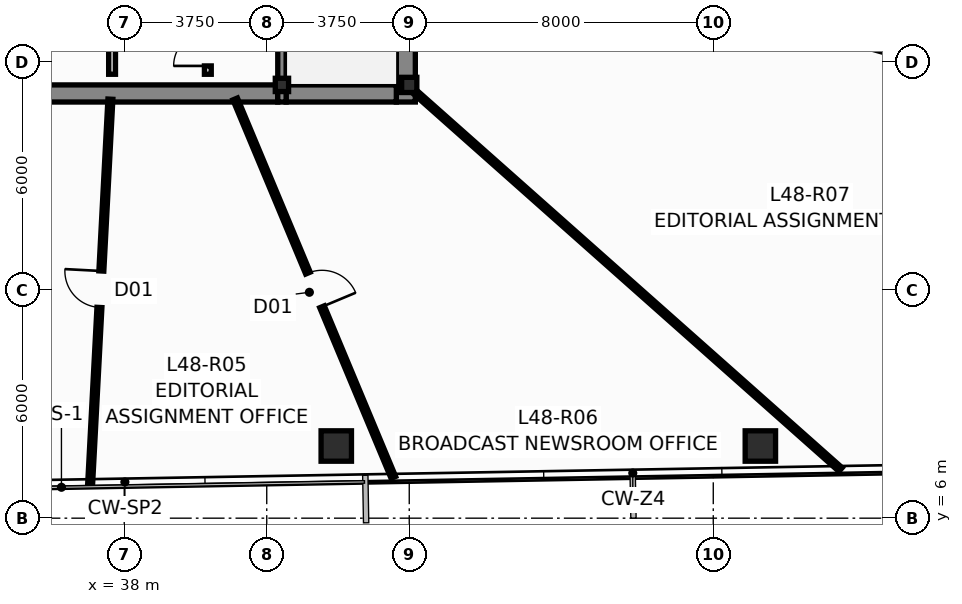
"""IFC4 building model, lengths in metres.
Left out: names, types, materials, properties, quantities, classifications, styles, units other than length and angle.
Written with IfcOpenShell. Run it as: python <this file> out.ifc"""

import sys

from ifc_helpers import new_model, si_unit, direction, frame, frame_2d, origin, origin_2d, place, context, subcontext, project, spatial, rectangle, hollow_rectangle, i_section, extrude, source, transform, mapped, element, fill, save


model = new_model("IFC4")
c1 = context("Model", 3, precision=1e-05, world=origin(), true_north=direction((0.0, 1.0)))
c2 = subcontext(c1, "Body", "Model", "MODEL_VIEW")
j1 = project(units=[si_unit("LENGTHUNIT", "METRE"), si_unit("PLANEANGLEUNIT", "RADIAN")], contexts=[c1])
p1 = place(None, origin())
s1 = spatial("IfcSite", under=j1, at=p1, CompositionType="ELEMENT")
p2 = place(p1, origin())
s2 = spatial("IfcBuilding", under=s1, at=p2, CompositionType="ELEMENT")
p3 = place(p2, frame((0.0, 0.0, 184.05)))
s3 = spatial("IfcBuildingStorey", under=s2, at=p3, CompositionType="ELEMENT", Elevation=184.05)
m1 = source(origin(), c2, "Body", "SweptSolid", [
    extrude(i_section(OverallWidth=0.4, OverallDepth=0.4, WebThickness=0.02, FlangeThickness=0.032, at=origin_2d()), origin(), (0.0, 0.0, 1.0), 3.65),
])
p4 = place(p3, frame((45.5, 17.4, 0.0), z_axis=(0.0, 0.0, 1.0), x_axis=(1.0, 0.0, 0.0)))
e1 = element("IfcColumn", 1, at=p4, inside=s3, PredefinedType="COLUMN", context=c2, shape_type="MappedRepresentation", body=[
    mapped(m1, transform((0.0, 0.0, 0.0), scale=1.0)),
])
m2 = source(origin(), c2, "Body", "SweptSolid", [
    extrude(hollow_rectangle(XDim=0.35, YDim=0.35, WallThickness=0.016, at=origin_2d()), origin(), (0.0, 0.0, 1.0), 3.65),
])
p5 = place(p3, frame((42.15, 17.4, 0.0), z_axis=(0.0, 0.0, 1.0), x_axis=(1.0, 0.0, 0.0)))
e2 = element("IfcColumn", 2, at=p5, inside=s3, PredefinedType="COLUMN", context=c2, shape_type="MappedRepresentation", body=[
    mapped(m2, transform((0.0, 0.0, 0.0), scale=1.0)),
])
p6 = place(p3, frame((45.41, 16.95, 0.0), z_axis=(0.0, 0.0, 1.0), x_axis=(0.0, 1.0, 0.0)))
e3 = element("IfcWall", 3, at=p6, inside=s3, PredefinedType="SHEAR", context=c2, shape_type="SweptSolid", body=[
    extrude(rectangle(XDim=13.275, YDim=0.5, at=frame_2d((6.638, 0.0))), origin(), (0.0, 0.0, 1.0), 3.65),
])
p7 = place(p6, frame((6.4, 0.0, 0.0)))
e4 = element("IfcOpeningElement", 4, at=p7, cuts=e3, PredefinedType="OPENING", context=c2, shape_type="SweptSolid", body=[
    extrude(rectangle(XDim=1.12, YDim=2.15, at=frame_2d((0.56, 1.075))), frame((0.0, 0.262, 0.0), z_axis=(0.0, -1.0, 0.0), x_axis=(1.0, 0.0, 0.0)), (0.0, 0.0, 1.0), 0.524),
])
p8 = place(p6, frame((10.85, 0.0, 0.0)))
e5 = element("IfcOpeningElement", 5, at=p8, cuts=e3, PredefinedType="OPENING", context=c2, shape_type="SweptSolid", body=[
    extrude(rectangle(XDim=1.2, YDim=2.2, at=frame_2d((0.6, 1.1))), frame((0.0, 0.262, 0.0), z_axis=(0.0, -1.0, 0.0), x_axis=(1.0, 0.0, 0.0)), (0.0, 0.0, 1.0), 0.524),
])
p9 = place(p3, frame((33.96, 17.175, 0.0), z_axis=(0.0, 0.0, 1.0), x_axis=(1.0, 0.0, 0.0)))
e6 = element("IfcWall", 6, at=p9, inside=s3, PredefinedType="SHEAR", context=c2, shape_type="SweptSolid", body=[
    extrude(rectangle(XDim=8.08, YDim=0.45, at=frame_2d((4.04, 0.0))), origin(), (0.0, 0.0, 1.0), 3.65),
])
p10 = place(p3, frame((42.26, 17.175, 0.0), z_axis=(0.0, 0.0, 1.0), x_axis=(1.0, 0.0, 0.0)))
e7 = element("IfcWall", 7, at=p10, inside=s3, PredefinedType="SHEAR", context=c2, shape_type="SweptSolid", body=[
    extrude(rectangle(XDim=2.9, YDim=0.45, at=frame_2d((1.45, 0.0))), origin(), (0.0, 0.0, 1.0), 3.65),
])
p11 = place(p3, frame((42.15, 16.95, 0.0), z_axis=(0.0, 0.0, 1.0), x_axis=(0.0, 1.0, 0.0)))
e8 = element("IfcWall", 8, at=p11, inside=s3, PredefinedType="SHEAR", context=c2, shape_type="SweptSolid", body=[
    extrude(rectangle(XDim=13.275, YDim=0.22, at=frame_2d((6.638, 0.0))), origin(), (0.0, 0.0, 1.0), 3.65),
])
m3 = source(origin(), c2, "Body", "SweptSolid", [
    extrude(hollow_rectangle(XDim=0.8, YDim=0.8, WallThickness=0.045, at=origin_2d()), origin(), (0.0, 0.0, 1.0), 3.651),
])
p12 = place(p3, frame((43.58, 7.899, 0.0), z_axis=(0.004480682206, 0.019795252729, 0.999794014513), x_axis=(-0.975326687046, 0.220766513622, 0.0)))
e9 = element("IfcColumn", 9, at=p12, inside=s3, PredefinedType="COLUMN", context=c2, shape_type="MappedRepresentation", body=[
    mapped(m3, transform((0.0, 0.0, 0.0), scale=1.0)),
])
m4 = source(origin(), c2, "Body", "SweptSolid", [
    extrude(hollow_rectangle(XDim=0.8, YDim=0.8, WallThickness=0.045, at=origin_2d()), origin(), (0.0, 0.0, 1.0), 3.651),
])
p13 = place(p3, frame((54.74, 7.899, 0.0), z_axis=(0.013440967269, 0.019793663242, 0.999713734673), x_axis=(-0.827290216258, 0.561774775229, 0.0)))
e10 = element("IfcColumn", 10, at=p13, inside=s3, PredefinedType="COLUMN", context=c2, shape_type="MappedRepresentation", body=[
    mapped(m4, transform((0.0, 0.0, 0.0), scale=1.0)),
])
p14 = place(p3, frame((37.68, 17.68, 0.0), z_axis=(0.0, 0.0, 1.0), x_axis=(0.0, 1.0, 0.0)))
e11 = element("IfcWall", 11, at=p14, inside=s3, PredefinedType="PARTITIONING", context=c2, shape_type="SweptSolid", body=[
    extrude(rectangle(XDim=2.7, YDim=0.18, at=frame_2d((1.35, 0.0))), origin(), (0.0, 0.0, 1.0), 3.4),
])
p15 = place(p14, frame((0.85, 0.0, 0.0)))
e12 = element("IfcOpeningElement", 12, at=p15, cuts=e11, PredefinedType="OPENING", context=c2, shape_type="SweptSolid", body=[
    extrude(rectangle(XDim=0.9, YDim=2.1, at=frame_2d((0.45, 1.05))), frame((0.0, 0.102, 0.0), z_axis=(0.0, -1.0, 0.0), x_axis=(1.0, 0.0, 0.0)), (0.0, 0.0, 1.0), 0.204),
])
p16 = place(p3, frame((40.2, 17.68, 0.0), z_axis=(0.0, 0.0, 1.0), x_axis=(0.0, 1.0, 0.0)))
e13 = element("IfcWall", 13, at=p16, inside=s3, PredefinedType="PARTITIONING", context=c2, shape_type="SweptSolid", body=[
    extrude(rectangle(XDim=2.7, YDim=0.18, at=frame_2d((1.35, 0.0))), origin(), (0.0, 0.0, 1.0), 3.4),
])
p17 = place(p16, frame((0.22, 0.0, 0.0)))
e14 = element("IfcOpeningElement", 14, at=p17, cuts=e13, PredefinedType="OPENING", context=c2, shape_type="SweptSolid", body=[
    extrude(rectangle(XDim=0.9, YDim=2.1, at=frame_2d((0.45, 1.05))), frame((0.0, 0.102, 0.0), z_axis=(0.0, -1.0, 0.0), x_axis=(1.0, 0.0, 0.0)), (0.0, 0.0, 1.0), 0.204),
])
p18 = place(p16, frame((1.54, 0.0, 0.0)))
e15 = element("IfcOpeningElement", 15, at=p18, cuts=e13, PredefinedType="OPENING", context=c2, shape_type="SweptSolid", body=[
    extrude(rectangle(XDim=0.9, YDim=2.1, at=frame_2d((0.45, 1.05))), frame((0.0, 0.102, 0.0), z_axis=(0.0, -1.0, 0.0), x_axis=(1.0, 0.0, 0.0)), (0.0, 0.0, 1.0), 0.204),
])
p19 = place(p3, frame((45.672, 21.819, 0.0), z_axis=(0.0, 0.0, 1.0), x_axis=(0.961904046383, -0.273387281254, 0.0)))
e16 = element("IfcWall", 16, at=p19, inside=s3, PredefinedType="PARTITIONING", context=c2, shape_type="SweptSolid", body=[
    extrude(rectangle(XDim=15.958, YDim=0.13, at=frame_2d((7.979, 0.0))), origin(), (0.0, 0.0, 1.0), 2.925),
])
p20 = place(p19, frame((7.565, 0.0, 0.0)))
e17 = element("IfcOpeningElement", 17, at=p20, cuts=e16, PredefinedType="OPENING", context=c2, shape_type="SweptSolid", body=[
    extrude(rectangle(XDim=0.96, YDim=2.15, at=frame_2d((0.48, 1.075))), frame((0.0, 0.077, 0.0), z_axis=(0.0, -1.0, 0.0), x_axis=(1.0, 0.0, 0.0)), (0.0, 0.0, 1.0), 0.154),
])
p21 = place(p3, frame((45.656, 17.21, 0.0), z_axis=(0.0, 0.0, 1.0), x_axis=(0.748005792128, -0.663692198947, 0.0)))
e18 = element("IfcWall", 18, at=p21, inside=s3, PredefinedType="PARTITIONING", context=c2, shape_type="SweptSolid", body=[
    extrude(rectangle(XDim=14.965, YDim=0.13, at=frame_2d((7.482, 0.0))), origin(), (0.0, 0.0, 1.0), 2.925),
])
p22 = place(p3, frame((40.919, 17.031, 0.0), z_axis=(0.0, 0.0, 1.0), x_axis=(0.385638121212, -0.922650117579, 0.0)))
e19 = element("IfcWall", 19, at=p22, inside=s3, PredefinedType="PARTITIONING", context=c2, shape_type="SweptSolid", body=[
    extrude(rectangle(XDim=10.795, YDim=0.13, at=frame_2d((5.397, 0.0))), origin(), (0.0, 0.0, 1.0), 3.4),
])
p23 = place(p22, frame((4.967, 0.0, 0.0)))
e20 = element("IfcOpeningElement", 20, at=p23, cuts=e19, PredefinedType="OPENING", context=c2, shape_type="SweptSolid", body=[
    extrude(rectangle(XDim=0.96, YDim=2.15, at=frame_2d((0.48, 1.075))), frame((0.0, 0.077, 0.0), z_axis=(0.0, -1.0, 0.0), x_axis=(1.0, 0.0, 0.0)), (0.0, 0.0, 1.0), 0.154),
])
p24 = place(p3, frame((37.105, 6.931, 0.0), z_axis=(0.0, 0.0, 1.0), x_axis=(0.052560100898, 0.998617762607, 0.0)))
e21 = element("IfcWall", 21, at=p24, inside=s3, PredefinedType="PARTITIONING", context=c2, shape_type="SweptSolid", body=[
    extrude(rectangle(XDim=10.107, YDim=0.13, at=frame_2d((5.054, 0.0))), origin(), (0.0, 0.0, 1.0), 3.4),
])
p25 = place(p24, frame((4.62, 0.0, 0.0)))
e22 = element("IfcOpeningElement", 22, at=p25, cuts=e21, PredefinedType="OPENING", context=c2, shape_type="SweptSolid", body=[
    extrude(rectangle(XDim=0.96, YDim=2.15, at=frame_2d((0.48, 1.075))), frame((0.0, 0.077, 0.0), z_axis=(0.0, -1.0, 0.0), x_axis=(1.0, 0.0, 0.0)), (0.0, 0.0, 1.0), 0.154),
])
p26 = place(p17, origin())
e23 = element("IfcDoor", 23, at=p26, inside=s3, OperationType="SINGLE_SWING_LEFT", PredefinedType="DOOR", context=c2, shape_type="SweptSolid", body=[
    extrude(rectangle(XDim=0.9, YDim=2.1, at=frame_2d((0.45, 1.05))), frame((0.0, 0.025, 0.0), z_axis=(0.0, -1.0, 0.0), x_axis=(1.0, 0.0, 0.0)), (0.0, 0.0, 1.0), 0.05),
])
fill(e14, e23)
p27 = place(p23, origin())
e24 = element("IfcDoor", 24, at=p27, inside=s3, OperationType="SINGLE_SWING_RIGHT", PredefinedType="DOOR", context=c2, shape_type="SweptSolid", body=[
    extrude(rectangle(XDim=0.96, YDim=2.15, at=frame_2d((0.48, 1.075))), frame((0.0, 0.025, 0.0), z_axis=(0.0, -1.0, 0.0), x_axis=(1.0, 0.0, 0.0)), (0.0, 0.0, 1.0), 0.05),
])
fill(e20, e24)
p28 = place(p25, origin())
e25 = element("IfcDoor", 25, at=p28, inside=s3, OperationType="SINGLE_SWING_RIGHT", PredefinedType="DOOR", context=c2, shape_type="SweptSolid", body=[
    extrude(rectangle(XDim=0.96, YDim=2.15, at=frame_2d((0.48, 1.075))), frame((0.0, 0.025, 0.0), z_axis=(0.0, -1.0, 0.0), x_axis=(1.0, 0.0, 0.0)), (0.0, 0.0, 1.0), 0.05),
])
fill(e22, e25)
save(model, sys.argv[1])
